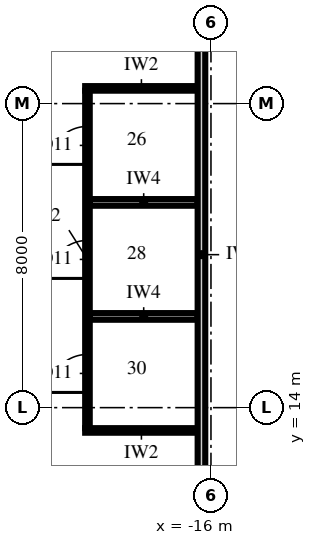
"""IFC4 building model, lengths in metres.
Left out: names, types, materials, properties, quantities, classifications, styles, units other than length and angle.
Written with IfcOpenShell. Run it as: python <this file> out.ifc"""

import sys

from ifc_helpers import new_model, si_unit, direction, frame, frame_2d, origin, place, context, subcontext, project, spatial, rectangle, extrude, element, fill, save


model = new_model("IFC4")
c1 = context("Model", 3, precision=1e-05, world=origin(), true_north=direction((0.0, 1.0)))
c2 = subcontext(c1, "Body", "Model", "MODEL_VIEW")
j1 = project(units=[si_unit("LENGTHUNIT", "METRE"), si_unit("PLANEANGLEUNIT", "RADIAN")], contexts=[c1])
p1 = place(None, origin())
s1 = spatial("IfcSite", under=j1, at=p1, CompositionType="ELEMENT")
p2 = place(p1, origin())
s2 = spatial("IfcBuilding", under=s1, at=p2, CompositionType="ELEMENT")
p3 = place(p2, frame((0.0, 0.0, 72.0)))
s3 = spatial("IfcBuildingStorey", under=s2, at=p3, CompositionType="ELEMENT", Elevation=72.0)
p4 = place(p3, frame((-19.31, 13.4, 0.0), z_axis=(0.0, 0.0, 1.0), x_axis=(1.0, 0.0, 0.0)))
e1 = element("IfcWall", 1, at=p4, inside=s3, PredefinedType="PARTITIONING", context=c2, shape_type="SweptSolid", body=[
    extrude(rectangle(XDim=2.96, YDim=0.12, at=frame_2d((1.48, 0.0))), origin(), (0.0, 0.0, 1.0), 3.85),
])
for number, where, z_axis, x_axis in (
    (2, (-19.19, 16.4, 0.0), (0.0, 0.0, 1.0), (1.0, 0.0, 0.0)),
    (3, (-19.19, 19.4, 0.0), (0.0, 0.0, 1.0), (1.0, 0.0, 0.0)),
):
    element("IfcWall", number, at=place(p3, frame(where, z_axis=z_axis, x_axis=x_axis)), inside=s3, PredefinedType="PARTITIONING", context=c2, shape_type="SweptSolid", body=[
        extrude(rectangle(XDim=2.84, YDim=0.175, at=frame_2d((1.42, 0.0))), origin(), (0.0, 0.0, 1.0), 3.85),
    ])
p5 = place(p3, frame((-19.31, 22.4, 0.0), z_axis=(0.0, 0.0, 1.0), x_axis=(1.0, 0.0, 0.0)))
e4 = element("IfcWall", 4, at=p5, inside=s3, PredefinedType="PARTITIONING", context=c2, shape_type="SweptSolid", body=[
    extrude(rectangle(XDim=2.96, YDim=0.12, at=frame_2d((1.48, 0.0))), origin(), (0.0, 0.0, 1.0), 3.85),
])
p6 = place(p3, frame((-19.25, 13.46, 0.0), z_axis=(0.0, 0.0, 1.0), x_axis=(0.0, 1.0, 0.0)))
e5 = element("IfcWall", 5, at=p6, inside=s3, PredefinedType="PARTITIONING", context=c2, shape_type="SweptSolid", body=[
    extrude(rectangle(XDim=8.88, YDim=0.12, at=frame_2d((4.44, 0.0))), origin(), (0.0, 0.0, 1.0), 3.25),
])
p7 = place(p6, frame((0.94, 0.0, 0.0)))
e6 = element("IfcOpeningElement", 6, at=p7, cuts=e5, PredefinedType="OPENING", context=c2, shape_type="SweptSolid", body=[
    extrude(rectangle(XDim=1.0, YDim=2.4, at=frame_2d((0.5, 1.2))), frame((0.0, 0.075, 0.0), z_axis=(0.0, -1.0, 0.0), x_axis=(1.0, 0.0, 0.0)), (0.0, 0.0, 1.0), 0.15),
])
p8 = place(p6, frame((3.94, 0.0, 0.0)))
e7 = element("IfcOpeningElement", 7, at=p8, cuts=e5, PredefinedType="OPENING", context=c2, shape_type="SweptSolid", body=[
    extrude(rectangle(XDim=1.0, YDim=2.4, at=frame_2d((0.5, 1.2))), frame((0.0, 0.075, 0.0), z_axis=(0.0, -1.0, 0.0), x_axis=(1.0, 0.0, 0.0)), (0.0, 0.0, 1.0), 0.15),
])
p9 = place(p6, frame((6.94, 0.0, 0.0)))
e8 = element("IfcOpeningElement", 8, at=p9, cuts=e5, PredefinedType="OPENING", context=c2, shape_type="SweptSolid", body=[
    extrude(rectangle(XDim=1.0, YDim=2.4, at=frame_2d((0.5, 1.2))), frame((0.0, 0.075, 0.0), z_axis=(0.0, -1.0, 0.0), x_axis=(1.0, 0.0, 0.0)), (0.0, 0.0, 1.0), 0.15),
])
p10 = place(p3, frame((-16.25, 9.9, 0.0), z_axis=(0.0, 0.0, 1.0), x_axis=(0.0, 1.0, 0.0)))
e9 = element("IfcWall", 9, at=p10, inside=s3, PredefinedType="PARTITIONING", context=c2, shape_type="SweptSolid", body=[
    extrude(rectangle(XDim=16.25, YDim=0.2, at=frame_2d((8.125, 0.0))), origin(), (0.0, 0.0, 1.0), 3.25),
])
p11 = place(p10, frame((14.75, 0.0, 0.0)))
e10 = element("IfcOpeningElement", 10, at=p11, cuts=e9, PredefinedType="OPENING", context=c2, shape_type="SweptSolid", body=[
    extrude(rectangle(XDim=1.2, YDim=2.4, at=frame_2d((0.6, 1.2))), frame((0.0, 0.115, 0.0), z_axis=(0.0, -1.0, 0.0), x_axis=(1.0, 0.0, 0.0)), (0.0, 0.0, 1.0), 0.23),
])
p12 = place(p7, origin())
e11 = element("IfcDoor", 11, at=p12, inside=s3, OperationType="SINGLE_SWING_RIGHT", PredefinedType="DOOR", context=c2, shape_type="SweptSolid", body=[
    extrude(rectangle(XDim=1.0, YDim=2.4, at=frame_2d((0.5, 1.2))), frame((0.0, 0.06, 0.0), z_axis=(0.0, -1.0, 0.0), x_axis=(1.0, 0.0, 0.0)), (0.0, 0.0, 1.0), 0.12),
])
fill(e6, e11)
p13 = place(p8, origin())
e12 = element("IfcDoor", 12, at=p13, inside=s3, OperationType="SINGLE_SWING_RIGHT", PredefinedType="DOOR", context=c2, shape_type="SweptSolid", body=[
    extrude(rectangle(XDim=1.0, YDim=2.4, at=frame_2d((0.5, 1.2))), frame((0.0, 0.06, 0.0), z_axis=(0.0, -1.0, 0.0), x_axis=(1.0, 0.0, 0.0)), (0.0, 0.0, 1.0), 0.12),
])
fill(e7, e12)
p14 = place(p9, origin())
e13 = element("IfcDoor", 13, at=p14, inside=s3, OperationType="SINGLE_SWING_RIGHT", PredefinedType="DOOR", context=c2, shape_type="SweptSolid", body=[
    extrude(rectangle(XDim=1.0, YDim=2.4, at=frame_2d((0.5, 1.2))), frame((0.0, 0.06, 0.0), z_axis=(0.0, -1.0, 0.0), x_axis=(1.0, 0.0, 0.0)), (0.0, 0.0, 1.0), 0.12),
])
fill(e8, e13)
save(model, sys.argv[1])
